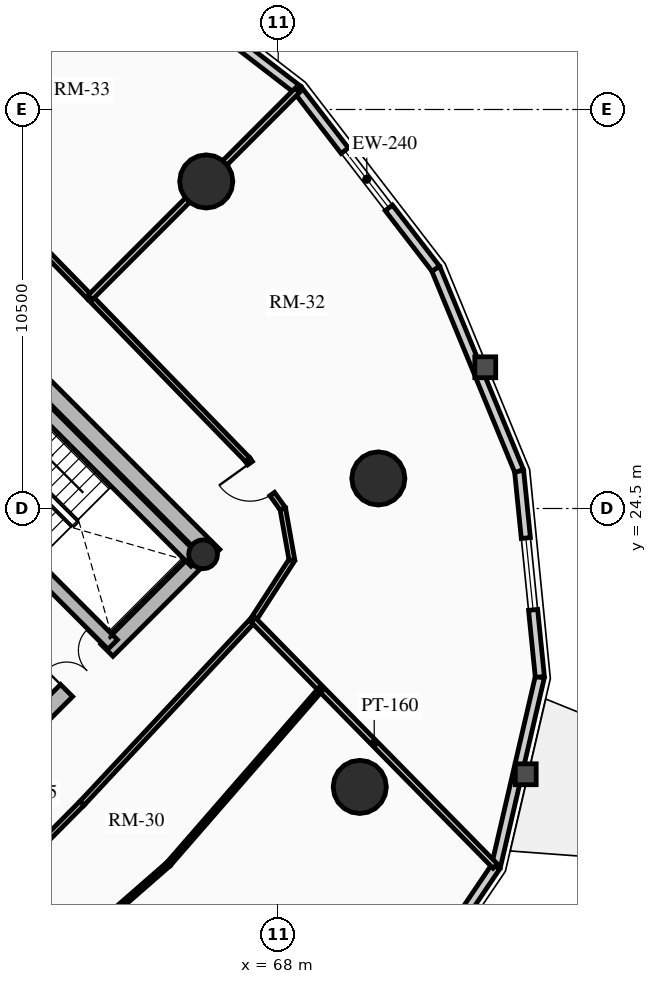
"""IFC4 building model, lengths in metres.
Left out: names, types, materials, properties, quantities, classifications, styles, units other than length and angle.
Written with IfcOpenShell. Run it as: python <this file> out.ifc"""

import sys

from ifc_helpers import new_model, si_unit, direction, frame, frame_2d, origin, origin_2d, place, context, subcontext, project, spatial, rectangle, circle, hollow_circle, extrude, source, transform, mapped, element, fill, save


model = new_model("IFC4")
c1 = context("Model", 3, precision=1e-05, world=origin(), true_north=direction((0.0, 1.0)))
c2 = subcontext(c1, "Body", "Model", "MODEL_VIEW")
j1 = project(units=[si_unit("LENGTHUNIT", "METRE"), si_unit("PLANEANGLEUNIT", "RADIAN")], contexts=[c1])
p1 = place(None, origin())
s1 = spatial("IfcSite", under=j1, at=p1, CompositionType="ELEMENT")
p2 = place(p1, origin())
s2 = spatial("IfcBuilding", under=s1, at=p2, CompositionType="ELEMENT")
p3 = place(p2, frame((0.0, 0.0, 87.61)))
s3 = spatial("IfcBuildingStorey", under=s2, at=p3, CompositionType="ELEMENT", Elevation=87.61)
p4 = place(p3, frame((66.303, 23.263, 0.0), z_axis=(0.0, 0.0, 1.0), x_axis=(-0.707106781187, 0.707106781187, 0.0)))
e1 = element("IfcWall", 1, at=p4, inside=s3, PredefinedType="SHEAR", context=c2, shape_type="SweptSolid", body=[
    extrude(rectangle(XDim=14.2, YDim=0.45, at=frame_2d((7.1, 0.0))), origin(), (0.0, 0.0, 1.0), 2.91),
])
p5 = place(p3, frame((58.578, 15.856, 0.0), z_axis=(0.0, 0.0, 1.0), x_axis=(0.707106781187, 0.707106781187, 0.0)))
e2 = element("IfcWall", 2, at=p5, inside=s3, PredefinedType="SHEAR", context=c2, shape_type="SweptSolid", body=[
    extrude(rectangle(XDim=10.7, YDim=0.45, at=frame_2d((5.35, 0.0))), origin(), (0.0, 0.0, 1.0), 2.91),
])
m1 = source(origin(), c2, "Body", "SweptSolid", [
    extrude(rectangle(XDim=1.5, YDim=2.02, at=frame_2d((0.75, 1.01))), frame((0.0, 0.235, 0.0), z_axis=(0.0, -1.0, 0.0), x_axis=(1.0, 0.0, 0.0)), (0.0, 0.0, 1.0), 0.47),
])
p6 = place(p5, frame((5.45, 0.0, 0.0)))
e3 = element("IfcOpeningElement", 3, at=p6, cuts=e2, PredefinedType="OPENING", context=c2, shape_type="MappedRepresentation", body=[
    mapped(m1, transform((0.0, 0.0, 0.0), x_axis=(1.0, 0.0, 0.0), y_axis=(0.0, 1.0, 0.0), z_axis=(0.0, 0.0, 1.0), scale=1.0)),
])
p7 = place(p3, frame((63.645, 20.922, 0.0), z_axis=(0.0, 0.0, 1.0), x_axis=(-0.707106781187, 0.707106781187, 0.0)))
e4 = element("IfcWall", 4, at=p7, inside=s3, PredefinedType="SHEAR", context=c2, shape_type="SweptSolid", body=[
    extrude(rectangle(XDim=13.75, YDim=0.35, at=frame_2d((6.875, 0.0))), origin(), (0.0, 0.0, 1.0), 2.91),
])
m2 = source(origin(), c2, "Body", "SweptSolid", [
    extrude(rectangle(XDim=1.1, YDim=2.015, at=frame_2d((0.55, 1.007))), frame((0.0, 0.185, 0.0), z_axis=(0.0, -1.0, 0.0), x_axis=(1.0, 0.0, 0.0)), (0.0, 0.0, 1.0), 0.37),
])
p8 = place(p7, frame((10.0, 0.0, 0.0)))
e5 = element("IfcOpeningElement", 5, at=p8, cuts=e4, PredefinedType="OPENING", context=c2, shape_type="MappedRepresentation", body=[
    mapped(m2, transform((0.0, 0.0, 0.0), x_axis=(1.0, 0.0, 0.0), y_axis=(0.0, 1.0, 0.0), z_axis=(0.0, 0.0, 1.0), scale=1.0)),
])
p9 = place(p7, frame((12.0, 0.0, 0.0)))
e6 = element("IfcOpeningElement", 6, at=p9, cuts=e4, PredefinedType="OPENING", context=c2, shape_type="MappedRepresentation", body=[
    mapped(m2, transform((0.0, 0.0, 0.0), x_axis=(1.0, 0.0, 0.0), y_axis=(0.0, 1.0, 0.0), z_axis=(0.0, 0.0, 1.0), scale=1.0)),
])
m3 = source(origin(), c2, "Body", "SweptSolid", [
    extrude(rectangle(XDim=1.15, YDim=2.02, at=frame_2d((0.575, 1.01))), frame((0.0, 0.185, 0.0), z_axis=(0.0, -1.0, 0.0), x_axis=(1.0, 0.0, 0.0)), (0.0, 0.0, 1.0), 0.37),
])
p10 = place(p7, frame((5.305, 0.0, 0.0)))
e7 = element("IfcOpeningElement", 7, at=p10, cuts=e4, PredefinedType="OPENING", context=c2, shape_type="MappedRepresentation", body=[
    mapped(m3, transform((0.0, 0.0, 0.0), x_axis=(1.0, 0.0, 0.0), y_axis=(0.0, 1.0, 0.0), z_axis=(0.0, 0.0, 1.0), scale=1.0)),
])
p11 = place(p3, frame((65.83, 23.107, 0.0), z_axis=(0.0, 0.0, 1.0), x_axis=(-0.707088616009, 0.707124945897, 0.0)))
e8 = element("IfcWall", 8, at=p11, inside=s3, PredefinedType="SHEAR", context=c2, shape_type="SweptSolid", body=[
    extrude(rectangle(XDim=6.72, YDim=0.35, at=frame_2d((3.36, 0.0))), origin(), (0.0, 0.0, 1.0), 2.91),
])
p12 = place(p3, frame((66.024, 23.294, 0.0), z_axis=(0.0, 0.0, 1.0), x_axis=(0.707106781187, 0.707106781187, 0.0)))
e9 = element("IfcColumn", 9, at=p12, inside=s3, PredefinedType="COLUMN", context=c2, shape_type="SweptSolid", body=[
    extrude(hollow_circle(Radius=0.38, WallThickness=0.032, at=origin_2d()), origin(), (0.0, 0.0, 1.0), 2.91),
])
for number, where, z_axis, x_axis in (
    (10, (66.107, 33.107, 0.0), (0.0, 0.0, 1.0), (1.0, 0.0, 0.0)),
    (11, (70.146, 17.173, 0.0), (0.0, 0.0, 1.0), (1.0, 0.0, 0.0)),
    (12, (70.635, 25.291, 0.0), (0.0, 0.0, 1.0), (1.0, 0.0, 0.0)),
):
    element("IfcColumn", number, at=place(p3, frame(where, z_axis=z_axis, x_axis=x_axis)), inside=s3, PredefinedType="USERDEFINED", context=c2, shape_type="SweptSolid", body=[
        extrude(circle(Radius=0.7, at=origin_2d()), origin(), (0.0, 0.0, 1.0), 2.91),
    ])
p13 = place(p3, frame((63.811, 39.145, 0.0), z_axis=(0.0, 0.0, 1.0), x_axis=(0.791982052206, -0.61054437102, 0.0)))
e13 = element("IfcWall", 13, at=p13, inside=s3, PredefinedType="SOLIDWALL", context=c2, shape_type="SweptSolid", body=[
    extrude(rectangle(XDim=5.942, YDim=0.24, at=frame_2d((2.971, 0.0))), origin(), (0.0, 0.0, 1.0), 2.179),
])
p14 = place(p3, frame((73.729, 15.08, 0.0), z_axis=(0.0, 0.0, 1.0), x_axis=(-0.559572880421, -0.828781148131, 0.0)))
e14 = element("IfcWall", 14, at=p14, inside=s3, PredefinedType="SOLIDWALL", context=c2, shape_type="SweptSolid", body=[
    extrude(rectangle(XDim=4.905, YDim=0.24, at=frame_2d((2.452, 0.0))), origin(), (0.0, 0.0, 1.0), 2.179),
])
m4 = source(origin(), c2, "Body", "SweptSolid", [
    extrude(rectangle(XDim=2.2, YDim=1.35, at=frame_2d((1.1, 0.675))), frame((0.0, 0.13, 0.0), z_axis=(0.0, -1.0, 0.0), x_axis=(1.0, 0.0, 0.0)), (0.0, 0.0, 1.0), 0.26),
])
p15 = place(p14, frame((1.352, 0.0, 0.65)))
e15 = element("IfcOpeningElement", 15, at=p15, cuts=e14, PredefinedType="OPENING", context=c2, shape_type="MappedRepresentation", body=[
    mapped(m4, transform((0.0, 0.0, 0.0), x_axis=(1.0, 0.0, 0.0), y_axis=(0.0, 1.0, 0.0), z_axis=(0.0, 0.0, 1.0), scale=1.0)),
])
p16 = place(p3, frame((74.885, 20.067, 0.0), z_axis=(0.0, 0.0, 1.0), x_axis=(-0.225834725257, -0.974165631126, 0.0)))
e16 = element("IfcWall", 16, at=p16, inside=s3, PredefinedType="SOLIDWALL", context=c2, shape_type="SweptSolid", body=[
    extrude(rectangle(XDim=5.119, YDim=0.24, at=frame_2d((2.56, 0.0))), origin(), (0.0, 0.0, 1.0), 2.179),
])
p17 = place(p3, frame((74.339, 25.487, 0.0), z_axis=(0.0, 0.0, 1.0), x_axis=(0.10015591906, -0.994971754311, 0.0)))
e17 = element("IfcWall", 17, at=p17, inside=s3, PredefinedType="SOLIDWALL", context=c2, shape_type="SweptSolid", body=[
    extrude(rectangle(XDim=5.448, YDim=0.24, at=frame_2d((2.724, 0.0))), origin(), (0.0, 0.0, 1.0), 2.179),
])
m5 = source(origin(), c2, "Body", "SweptSolid", [
    extrude(rectangle(XDim=1.9, YDim=1.35, at=frame_2d((0.95, 0.675))), frame((0.0, 0.13, 0.0), z_axis=(0.0, -1.0, 0.0), x_axis=(1.0, 0.0, 0.0)), (0.0, 0.0, 1.0), 0.26),
])
p18 = place(p17, frame((1.774, 0.0, 0.65)))
e18 = element("IfcOpeningElement", 18, at=p18, cuts=e17, PredefinedType="OPENING", context=c2, shape_type="MappedRepresentation", body=[
    mapped(m5, transform((0.0, 0.0, 0.0), x_axis=(1.0, 0.0, 0.0), y_axis=(0.0, 1.0, 0.0), z_axis=(0.0, 0.0, 1.0), scale=1.0)),
])
p19 = place(p3, frame((72.145, 30.811, 0.0), z_axis=(0.0, 0.0, 1.0), x_axis=(0.381027003055, -0.924563909604, 0.0)))
e19 = element("IfcWall", 19, at=p19, inside=s3, PredefinedType="SOLIDWALL", context=c2, shape_type="SweptSolid", body=[
    extrude(rectangle(XDim=5.758, YDim=0.24, at=frame_2d((2.879, 0.0))), origin(), (0.0, 0.0, 1.0), 2.179),
])
p20 = place(p3, frame((68.517, 35.517, 0.0), z_axis=(0.0, 0.0, 1.0), x_axis=(0.61054437102, -0.791982052206, 0.0)))
e20 = element("IfcWall", 20, at=p20, inside=s3, PredefinedType="SOLIDWALL", context=c2, shape_type="SweptSolid", body=[
    extrude(rectangle(XDim=5.942, YDim=0.24, at=frame_2d((2.971, 0.0))), origin(), (0.0, 0.0, 1.0), 2.179),
])
p21 = place(p20, frame((2.021, 0.0, 0.65)))
e21 = element("IfcOpeningElement", 21, at=p21, cuts=e20, PredefinedType="OPENING", context=c2, shape_type="MappedRepresentation", body=[
    mapped(m5, transform((0.0, 0.0, 0.0), x_axis=(1.0, 0.0, 0.0), y_axis=(0.0, 1.0, 0.0), z_axis=(0.0, 0.0, 1.0), scale=1.0)),
])
p22 = place(p3, frame((63.051, 30.051, 0.0), z_axis=(0.0, 0.0, 1.0), x_axis=(-0.698846622234, 0.715271555839, 0.0)))
e22 = element("IfcWall", 22, at=p22, inside=s3, PredefinedType="PARTITIONING", context=c2, shape_type="SweptSolid", body=[
    extrude(rectangle(XDim=6.05, YDim=0.15, at=frame_2d((3.025, 0.0))), origin(), (0.0, 0.0, 1.0), 2.225),
])
p23 = place(p3, frame((60.515, 14.401, 0.0), z_axis=(0.0, 0.0, 1.0), x_axis=(0.704179607439, 0.710021887316, 0.0)))
e23 = element("IfcWall", 23, at=p23, inside=s3, PredefinedType="PARTITIONING", context=c2, shape_type="SweptSolid", body=[
    extrude(rectangle(XDim=3.301, YDim=0.15, at=frame_2d((1.651, 0.0))), origin(), (0.0, 0.0, 1.0), 2.225),
])
p24 = place(p3, frame((62.839, 16.745, 0.0), z_axis=(0.0, 0.0, 1.0), x_axis=(0.682386779427, 0.73099130177, 0.0)))
e24 = element("IfcWall", 24, at=p24, inside=s3, PredefinedType="PARTITIONING", context=c2, shape_type="SweptSolid", body=[
    extrude(rectangle(XDim=6.6, YDim=0.15, at=frame_2d((3.3, 0.0))), origin(), (0.0, 0.0, 1.0), 2.225),
])
p25 = place(p3, frame((67.343, 21.569, 0.0), z_axis=(0.0, 0.0, 1.0), x_axis=(0.542722446786, 0.83991210597, 0.0)))
e25 = element("IfcWall", 25, at=p25, inside=s3, PredefinedType="PARTITIONING", context=c2, shape_type="SweptSolid", body=[
    extrude(rectangle(XDim=1.876, YDim=0.15, at=frame_2d((0.938, 0.0))), origin(), (0.0, 0.0, 1.0), 2.225),
])
p26 = place(p3, frame((68.362, 23.145, 0.0), z_axis=(0.0, 0.0, 1.0), x_axis=(-0.175605524171, 0.984460613677, 0.0)))
e26 = element("IfcWall", 26, at=p26, inside=s3, PredefinedType="PARTITIONING", context=c2, shape_type="SweptSolid", body=[
    extrude(rectangle(XDim=1.369, YDim=0.15, at=frame_2d((0.685, 0.0))), origin(), (0.0, 0.0, 1.0), 2.225),
])
p27 = place(p3, frame((68.121, 24.493, 0.0), z_axis=(0.0, 0.0, 1.0), x_axis=(-0.583188677624, 0.812336732083, 0.0)))
e27 = element("IfcWall", 27, at=p27, inside=s3, PredefinedType="PARTITIONING", context=c2, shape_type="SweptSolid", body=[
    extrude(rectangle(XDim=1.597, YDim=0.15, at=frame_2d((0.799, 0.0))), origin(), (0.0, 0.0, 1.0), 2.225),
])
m6 = source(origin(), c2, "Body", "SweptSolid", [
    extrude(rectangle(XDim=1.0, YDim=2.015, at=frame_2d((0.5, 1.007))), frame((0.0, 0.085, 0.0), z_axis=(0.0, -1.0, 0.0), x_axis=(1.0, 0.0, 0.0)), (0.0, 0.0, 1.0), 0.17),
])
p28 = place(p27, frame((0.477, 0.0, 0.0)))
e28 = element("IfcOpeningElement", 28, at=p28, cuts=e27, PredefinedType="OPENING", context=c2, shape_type="MappedRepresentation", body=[
    mapped(m6, transform((0.0, 0.0, 0.0), x_axis=(1.0, 0.0, 0.0), y_axis=(0.0, 1.0, 0.0), z_axis=(0.0, 0.0, 1.0), scale=1.0)),
])
p29 = place(p3, frame((67.19, 25.791, 0.0), z_axis=(0.0, 0.0, 1.0), x_axis=(-0.696839457851, 0.717227139742, 0.0)))
e29 = element("IfcWall", 29, at=p29, inside=s3, PredefinedType="PARTITIONING", context=c2, shape_type="SweptSolid", body=[
    extrude(rectangle(XDim=5.939, YDim=0.15, at=frame_2d((2.97, 0.0))), origin(), (0.0, 0.0, 1.0), 2.655),
])
p30 = place(p3, frame((63.051, 30.051, 0.0), z_axis=(0.0, 0.0, 1.0), x_axis=(0.707106781187, 0.707106781187, 0.0)))
e30 = element("IfcWall", 30, at=p30, inside=s3, PredefinedType="PARTITIONING", context=c2, shape_type="SweptSolid", body=[
    extrude(rectangle(XDim=7.711, YDim=0.16, at=frame_2d((3.855, 0.0))), origin(), (0.0, 0.0, 1.0), 2.179),
])
p31 = place(p3, frame((67.343, 21.569, 0.0), z_axis=(0.0, 0.0, 1.0), x_axis=(0.700899237588, -0.713260302238, 0.0)))
e31 = element("IfcWall", 31, at=p31, inside=s3, PredefinedType="PARTITIONING", context=c2, shape_type="SweptSolid", body=[
    extrude(rectangle(XDim=9.085, YDim=0.16, at=frame_2d((4.543, 0.0))), origin(), (0.0, 0.0, 1.0), 2.179),
])
p32 = place(p3, frame((62.306, 12.689, 0.0), z_axis=(0.0, 0.0, 1.0), x_axis=(0.753127589311, 0.657874482115, 0.0)))
e32 = element("IfcWall", 32, at=p32, inside=s3, PredefinedType="PARTITIONING", context=c2, shape_type="SweptSolid", body=[
    extrude(rectangle(XDim=3.732, YDim=0.125, at=frame_2d((1.866, 0.0))), origin(), (0.0, 0.0, 1.0), 2.225),
])
p33 = place(p3, frame((65.116, 15.145, 0.0), z_axis=(0.0, 0.0, 1.0), x_axis=(0.656272685344, 0.75452379848, 0.0)))
e33 = element("IfcWall", 33, at=p33, inside=s3, PredefinedType="PARTITIONING", context=c2, shape_type="SweptSolid", body=[
    extrude(rectangle(XDim=6.11, YDim=0.125, at=frame_2d((3.055, 0.0))), origin(), (0.0, 0.0, 1.0), 2.225),
])
m7 = source(origin(), c2, "Body", "SweptSolid", [
    extrude(rectangle(XDim=1.9, YDim=1.35, at=frame_2d((0.95, 0.675))), frame((0.0, 0.03, 0.0), z_axis=(0.0, -1.0, 0.0), x_axis=(1.0, 0.0, 0.0)), (0.0, 0.0, 1.0), 0.06),
])
p34 = place(p18, origin())
e34 = element("IfcWindow", 34, at=p34, inside=s3, PartitioningType="DOUBLE_PANEL_VERTICAL", PredefinedType="WINDOW", context=c2, shape_type="MappedRepresentation", body=[
    mapped(m7, transform((0.0, 0.0, 0.0), x_axis=(1.0, 0.0, 0.0), y_axis=(0.0, 1.0, 0.0), z_axis=(0.0, 0.0, 1.0), scale=1.0)),
])
fill(e18, e34)
p35 = place(p21, origin())
e35 = element("IfcWindow", 35, at=p35, inside=s3, PartitioningType="DOUBLE_PANEL_VERTICAL", PredefinedType="WINDOW", context=c2, shape_type="MappedRepresentation", body=[
    mapped(m7, transform((0.0, 0.0, 0.0), x_axis=(1.0, 0.0, 0.0), y_axis=(0.0, 1.0, 0.0), z_axis=(0.0, 0.0, 1.0), scale=1.0)),
])
fill(e21, e35)
m8 = source(origin(), c2, "Body", "SweptSolid", [
    extrude(rectangle(XDim=1.5, YDim=2.02, at=frame_2d((0.75, 1.01))), frame((0.0, 0.025, 0.0), z_axis=(0.0, -1.0, 0.0), x_axis=(1.0, 0.0, 0.0)), (0.0, 0.0, 1.0), 0.05),
])
p36 = place(p6, origin())
e36 = element("IfcDoor", 36, at=p36, inside=s3, OperationType="DOUBLE_DOOR_SINGLE_SWING", PredefinedType="DOOR", context=c2, shape_type="MappedRepresentation", body=[
    mapped(m8, transform((0.0, 0.0, 0.0), x_axis=(1.0, 0.0, 0.0), y_axis=(0.0, 1.0, 0.0), z_axis=(0.0, 0.0, 1.0), scale=1.0)),
])
fill(e3, e36)
m9 = source(origin(), c2, "Body", "SweptSolid", [
    extrude(rectangle(XDim=1.0, YDim=2.015, at=frame_2d((0.5, 1.007))), frame((0.0, 0.025, 0.0), z_axis=(0.0, -1.0, 0.0), x_axis=(1.0, 0.0, 0.0)), (0.0, 0.0, 1.0), 0.05),
])
p37 = place(p28, origin())
e37 = element("IfcDoor", 37, at=p37, inside=s3, OperationType="SINGLE_SWING_RIGHT", PredefinedType="DOOR", context=c2, shape_type="MappedRepresentation", body=[
    mapped(m9, transform((0.0, 0.0, 0.0), x_axis=(1.0, 0.0, 0.0), y_axis=(0.0, 1.0, 0.0), z_axis=(0.0, 0.0, 1.0), scale=1.0)),
])
fill(e28, e37)
save(model, sys.argv[1])
